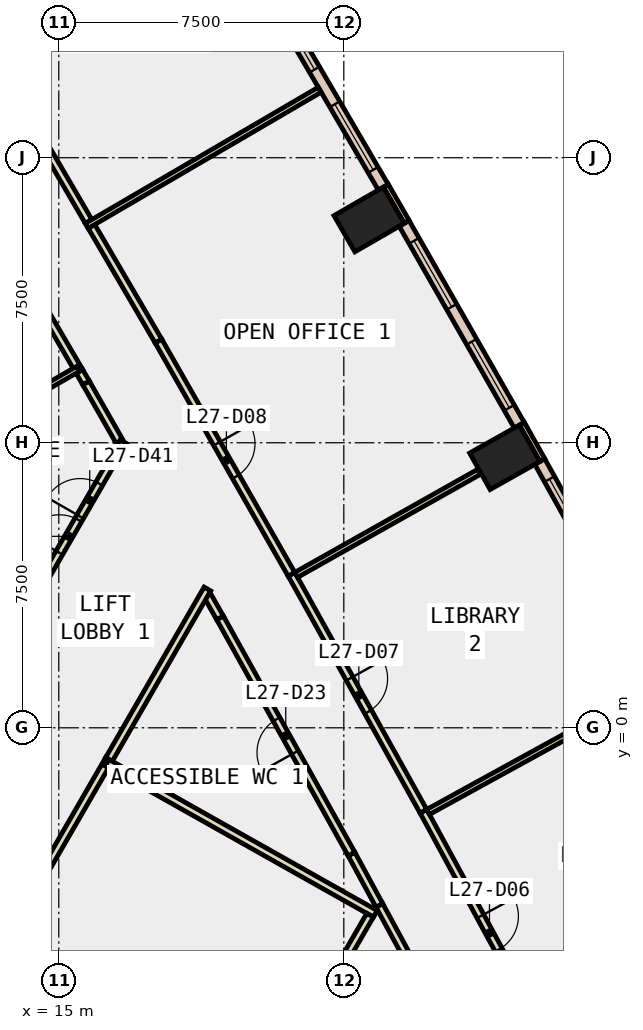
"""IFC4 building model, lengths in metres.
Left out: names, types, materials, properties, quantities, classifications, styles, units other than length and angle.
Written with IfcOpenShell. Run it as: python <this file> out.ifc"""

import sys

from ifc_helpers import new_model, si_unit, direction, frame, frame_2d, origin, origin_2d, place, context, subcontext, project, spatial, rectangle, extrude, element, fill, save


model = new_model("IFC4")
c1 = context("Model", 3, precision=1e-05, world=origin(), true_north=direction((0.0, 1.0)))
c2 = subcontext(c1, "Body", "Model", "MODEL_VIEW")
j1 = project(units=[si_unit("LENGTHUNIT", "METRE"), si_unit("PLANEANGLEUNIT", "RADIAN")], contexts=[c1])
p1 = place(None, origin())
s1 = spatial("IfcSite", under=j1, at=p1, CompositionType="ELEMENT")
p2 = place(p1, origin())
s2 = spatial("IfcBuilding", under=s1, at=p2, CompositionType="ELEMENT")
p3 = place(p2, frame((0.0, 0.0, 124.4)))
s3 = spatial("IfcBuildingStorey", under=s2, at=p3, CompositionType="ELEMENT", Elevation=124.4)
for number, where, z_axis, x_axis in (
    (1, (26.735, 7.117, -0.4), (0.0, 0.0, 1.0), (-0.49, 0.872, 0.0)),
    (2, (23.166, 13.375, -0.4), (0.0, 0.0, 1.0), (-0.5, 0.866, 0.0)),
):
    element("IfcColumn", number, at=place(p3, frame(where, z_axis=z_axis, x_axis=x_axis)), inside=s3, PredefinedType="COLUMN", context=c2, shape_type="SweptSolid", body=[
        extrude(rectangle(XDim=1.1, YDim=1.5, at=origin_2d()), origin(), (0.0, 0.0, 1.0), 4.2),
    ])
p4 = place(p3, frame((9.31, -5.375, -0.4), z_axis=(0.0, 0.0, 1.0), x_axis=(0.866017533419, -0.500013631625, 0.0)))
e3 = element("IfcWall", 3, at=p4, inside=s3, PredefinedType="SHEAR", context=c2, shape_type="SweptSolid", body=[
    extrude(rectangle(XDim=9.0, YDim=0.8, at=frame_2d((4.5, 0.0))), origin(), (0.0, 0.0, 1.0), 4.2),
])
p5 = place(p3, frame((27.724, 7.042, 0.0), z_axis=(0.0, 0.0, 1.0), x_axis=(-0.490008344094, 0.871717742574, 0.0)))
e4 = element("IfcWall", 4, at=p5, inside=s3, PredefinedType="STANDARD", context=c2, shape_type="SweptSolid", body=[
    extrude(rectangle(XDim=1.1, YDim=0.15, at=frame_2d((0.55, 0.0))), origin(), (0.0, 0.0, 1.0), 3.8),
])
p6 = place(p3, frame((24.155, 13.311, 0.0), z_axis=(0.0, 0.0, 1.0), x_axis=(-0.499933745558, 0.866063652425, 0.0)))
e5 = element("IfcWall", 5, at=p6, inside=s3, PredefinedType="STANDARD", context=c2, shape_type="SweptSolid", body=[
    extrude(rectangle(XDim=1.1, YDim=0.15, at=frame_2d((0.55, 0.0))), origin(), (0.0, 0.0, 1.0), 3.8),
])
p7 = place(p3, frame((30.629, 1.662, 0.0), z_axis=(0.0, 0.0, 1.0), x_axis=(-0.486229342917, 0.873831234327, 0.0)))
e6 = element("IfcWall", 6, at=p7, inside=s3, PredefinedType="STANDARD", context=c2, shape_type="SweptSolid", body=[
    extrude(rectangle(XDim=6.114, YDim=0.3, at=frame_2d((3.057, 0.0))), origin(), (0.0, 0.0, 1.0), 3.8),
])
p8 = place(p7, frame((0.529, 0.0, 0.9)))
e7 = element("IfcOpeningElement", 7, at=p8, cuts=e6, PredefinedType="OPENING", context=c2, shape_type="SweptSolid", body=[
    extrude(rectangle(XDim=2.0, YDim=2.6, at=frame_2d((1.0, 1.3))), frame((0.0, 0.16, 0.0), z_axis=(0.0, -1.0, 0.0), x_axis=(1.0, 0.0, 0.0)), (0.0, 0.0, 1.0), 0.32),
])
p9 = place(p7, frame((3.586, 0.0, 0.9)))
e8 = element("IfcOpeningElement", 8, at=p9, cuts=e6, PredefinedType="OPENING", context=c2, shape_type="SweptSolid", body=[
    extrude(rectangle(XDim=2.0, YDim=2.6, at=frame_2d((1.0, 1.3))), frame((0.0, 0.16, 0.0), z_axis=(0.0, -1.0, 0.0), x_axis=(1.0, 0.0, 0.0)), (0.0, 0.0, 1.0), 0.32),
])
p10 = place(p3, frame((27.117, 7.961, 0.0), z_axis=(0.0, 0.0, 1.0), x_axis=(-0.495472401298, 0.868623681206, 0.0)))
e9 = element("IfcWall", 9, at=p10, inside=s3, PredefinedType="STANDARD", context=c2, shape_type="SweptSolid", body=[
    extrude(rectangle(XDim=6.115, YDim=0.3, at=frame_2d((3.058, 0.0))), origin(), (0.0, 0.0, 1.0), 3.8),
])
p11 = place(p10, frame((0.529, 0.0, 0.9)))
e10 = element("IfcOpeningElement", 10, at=p11, cuts=e9, PredefinedType="OPENING", context=c2, shape_type="SweptSolid", body=[
    extrude(rectangle(XDim=2.0, YDim=2.6, at=frame_2d((1.0, 1.3))), frame((0.0, 0.16, 0.0), z_axis=(0.0, -1.0, 0.0), x_axis=(1.0, 0.0, 0.0)), (0.0, 0.0, 1.0), 0.32),
])
p12 = place(p10, frame((3.587, 0.0, 0.9)))
e11 = element("IfcOpeningElement", 11, at=p12, cuts=e9, PredefinedType="OPENING", context=c2, shape_type="SweptSolid", body=[
    extrude(rectangle(XDim=2.0, YDim=2.6, at=frame_2d((1.0, 1.3))), frame((0.0, 0.16, 0.0), z_axis=(0.0, -1.0, 0.0), x_axis=(1.0, 0.0, 0.0)), (0.0, 0.0, 1.0), 0.32),
])
p13 = place(p3, frame((23.538, 14.224, 0.0), z_axis=(0.0, 0.0, 1.0), x_axis=(-0.504441987427, 0.863445586775, 0.0)))
e12 = element("IfcWall", 12, at=p13, inside=s3, PredefinedType="STANDARD", context=c2, shape_type="SweptSolid", body=[
    extrude(rectangle(XDim=6.114, YDim=0.3, at=frame_2d((3.057, 0.0))), origin(), (0.0, 0.0, 1.0), 3.8),
])
p14 = place(p13, frame((0.528, 0.0, 0.9)))
e13 = element("IfcOpeningElement", 13, at=p14, cuts=e12, PredefinedType="OPENING", context=c2, shape_type="SweptSolid", body=[
    extrude(rectangle(XDim=2.0, YDim=2.6, at=frame_2d((1.0, 1.3))), frame((0.0, 0.16, 0.0), z_axis=(0.0, -1.0, 0.0), x_axis=(1.0, 0.0, 0.0)), (0.0, 0.0, 1.0), 0.32),
])
p15 = place(p13, frame((3.585, 0.0, 0.9)))
e14 = element("IfcOpeningElement", 14, at=p15, cuts=e12, PredefinedType="OPENING", context=c2, shape_type="SweptSolid", body=[
    extrude(rectangle(XDim=2.0, YDim=2.6, at=frame_2d((1.0, 1.3))), frame((0.0, 0.16, 0.0), z_axis=(0.0, -1.0, 0.0), x_axis=(1.0, 0.0, 0.0)), (0.0, 0.0, 1.0), 0.32),
])
p16 = place(p3, frame((16.601, 7.526, 0.0), z_axis=(0.0, 0.0, 1.0), x_axis=(-0.495652400286, 0.868520983103, 0.0)))
e15 = element("IfcWall", 15, at=p16, inside=s3, PredefinedType="PARTITIONING", context=c2, shape_type="SweptSolid", body=[
    extrude(rectangle(XDim=1.784, YDim=0.2, at=frame_2d((0.892, 0.0))), origin(), (0.0, 0.0, 1.0), 3.8),
])
p17 = place(p3, frame((15.717, 9.075, 0.0), z_axis=(0.0, 0.0, 1.0), x_axis=(-0.50235401398, 0.864662040706, 0.0)))
e16 = element("IfcWall", 16, at=p17, inside=s3, PredefinedType="PARTITIONING", context=c2, shape_type="SweptSolid", body=[
    extrude(rectangle(XDim=0.35, YDim=0.2, at=frame_2d((0.175, 0.0))), origin(), (0.0, 0.0, 1.0), 3.8),
])
p18 = place(p3, frame((15.541, 9.378, 0.0), z_axis=(0.0, 0.0, 1.0), x_axis=(-0.504428354193, 0.863453551435, 0.0)))
e17 = element("IfcWall", 17, at=p18, inside=s3, PredefinedType="PARTITIONING", context=c2, shape_type="SweptSolid", body=[
    extrude(rectangle(XDim=5.365, YDim=0.2, at=frame_2d((2.682, 0.0))), origin(), (0.0, 0.0, 1.0), 3.8),
])
p19 = place(p18, frame((2.182, 0.0, 0.0)))
e18 = element("IfcOpeningElement", 18, at=p19, cuts=e17, PredefinedType="OPENING", context=c2, shape_type="SweptSolid", body=[
    extrude(rectangle(XDim=1.0, YDim=2.1, at=frame_2d((0.5, 1.05))), frame((0.0, 0.11, 0.0), z_axis=(0.0, -1.0, 0.0), x_axis=(1.0, 0.0, 0.0)), (0.0, 0.0, 1.0), 0.22),
])
p20 = place(p3, frame((23.437, -4.676, 0.0), z_axis=(0.0, 0.0, 1.0), x_axis=(-0.47686467088, 0.878976726465, 0.0)))
e19 = element("IfcWall", 19, at=p20, inside=s3, PredefinedType="PARTITIONING", context=c2, shape_type="SweptSolid", body=[
    extrude(rectangle(XDim=1.542, YDim=0.2, at=frame_2d((0.771, 0.0))), origin(), (0.0, 0.0, 1.0), 3.8),
])
p21 = place(p3, frame((22.702, -3.321, 0.0), z_axis=(0.0, 0.0, 1.0), x_axis=(-0.486304341235, 0.873789498504, 0.0)))
e20 = element("IfcWall", 20, at=p21, inside=s3, PredefinedType="PARTITIONING", context=c2, shape_type="SweptSolid", body=[
    extrude(rectangle(XDim=7.113, YDim=0.2, at=frame_2d((3.556, 0.0))), origin(), (0.0, 0.0, 1.0), 3.8),
])
p22 = place(p21, frame((3.057, 0.0, 0.0)))
e21 = element("IfcOpeningElement", 21, at=p22, cuts=e20, PredefinedType="OPENING", context=c2, shape_type="SweptSolid", body=[
    extrude(rectangle(XDim=1.0, YDim=2.1, at=frame_2d((0.5, 1.05))), frame((0.0, 0.11, 0.0), z_axis=(0.0, -1.0, 0.0), x_axis=(1.0, 0.0, 0.0)), (0.0, 0.0, 1.0), 0.22),
])
p23 = place(p3, frame((19.243, 2.894, 0.0), z_axis=(0.0, 0.0, 1.0), x_axis=(-0.494108984218, 0.869399972231, 0.0)))
e22 = element("IfcWall", 22, at=p23, inside=s3, PredefinedType="PARTITIONING", context=c2, shape_type="SweptSolid", body=[
    extrude(rectangle(XDim=0.674, YDim=0.2, at=frame_2d((0.337, 0.0))), origin(), (0.0, 0.0, 1.0), 3.8),
])
p24 = place(p3, frame((26.095, -9.574, 0.0), z_axis=(0.0, 0.0, 1.0), x_axis=(-0.476963271937, 0.878923226012, 0.0)))
e23 = element("IfcWall", 23, at=p24, inside=s3, PredefinedType="PARTITIONING", context=c2, shape_type="SweptSolid", body=[
    extrude(rectangle(XDim=5.573, YDim=0.2, at=frame_2d((2.786, 0.0))), origin(), (0.0, 0.0, 1.0), 3.8),
])
p25 = place(p24, frame((2.386, 0.0, 0.0)))
e24 = element("IfcOpeningElement", 24, at=p25, cuts=e23, PredefinedType="OPENING", context=c2, shape_type="SweptSolid", body=[
    extrude(rectangle(XDim=1.0, YDim=2.1, at=frame_2d((0.5, 1.05))), frame((0.0, 0.11, 0.0), z_axis=(0.0, -1.0, 0.0), x_axis=(1.0, 0.0, 0.0)), (0.0, 0.0, 1.0), 0.22),
])
p26 = place(p3, frame((24.595, -2.196, 0.0), z_axis=(0.0, 0.0, 1.0), x_axis=(0.47695522124, -0.878927594818, 0.0)))
e25 = element("IfcWall", 25, at=p26, inside=s3, PredefinedType="PARTITIONING", context=c2, shape_type="SweptSolid", body=[
    extrude(rectangle(XDim=7.137, YDim=0.2, at=frame_2d((3.568, 0.0))), origin(), (0.0, 0.0, 1.0), 3.8),
])
p27 = place(p26, frame((3.144, 0.0, 0.0)))
e26 = element("IfcOpeningElement", 26, at=p27, cuts=e25, PredefinedType="OPENING", context=c2, shape_type="SweptSolid", body=[
    extrude(rectangle(XDim=1.0, YDim=2.1, at=frame_2d((0.5, 1.05))), frame((0.0, 0.11, 0.0), z_axis=(0.0, -1.0, 0.0), x_axis=(1.0, 0.0, 0.0)), (0.0, 0.0, 1.0), 0.22),
])
p28 = place(p3, frame((21.124, 4.04, 0.0), z_axis=(0.0, 0.0, 1.0), x_axis=(0.486229558972, -0.873831114107, 0.0)))
e27 = element("IfcWall", 27, at=p28, inside=s3, PredefinedType="PARTITIONING", context=c2, shape_type="SweptSolid", body=[
    extrude(rectangle(XDim=7.136, YDim=0.2, at=frame_2d((3.568, 0.0))), origin(), (0.0, 0.0, 1.0), 3.8),
])
p29 = place(p28, frame((3.143, 0.0, 0.0)))
e28 = element("IfcOpeningElement", 28, at=p29, cuts=e27, PredefinedType="OPENING", context=c2, shape_type="SweptSolid", body=[
    extrude(rectangle(XDim=1.0, YDim=2.1, at=frame_2d((0.5, 1.05))), frame((0.0, 0.11, 0.0), z_axis=(0.0, -1.0, 0.0), x_axis=(1.0, 0.0, 0.0)), (0.0, 0.0, 1.0), 0.22),
])
p30 = place(p3, frame((15.86, 13.193, 0.0), z_axis=(0.0, 0.0, 1.0), x_axis=(0.504383407959, -0.863479807393, 0.0)))
e29 = element("IfcWall", 29, at=p30, inside=s3, PredefinedType="PARTITIONING", context=c2, shape_type="SweptSolid", body=[
    extrude(rectangle(XDim=3.495, YDim=0.2, at=frame_2d((1.748, 0.0))), origin(), (0.0, 0.0, 1.0), 3.8),
])
p31 = place(p3, frame((17.623, 10.175, 0.0), z_axis=(0.0, 0.0, 1.0), x_axis=(0.4954688358, -0.868625714995, 0.0)))
e30 = element("IfcWall", 30, at=p31, inside=s3, PredefinedType="PARTITIONING", context=c2, shape_type="SweptSolid", body=[
    extrude(rectangle(XDim=7.064, YDim=0.2, at=frame_2d((3.532, 0.0))), origin(), (0.0, 0.0, 1.0), 3.8),
])
p32 = place(p31, frame((3.107, 0.0, 0.0)))
e31 = element("IfcOpeningElement", 31, at=p32, cuts=e30, PredefinedType="OPENING", context=c2, shape_type="SweptSolid", body=[
    extrude(rectangle(XDim=1.0, YDim=2.1, at=frame_2d((0.5, 1.05))), frame((0.0, 0.11, 0.0), z_axis=(0.0, -1.0, 0.0), x_axis=(1.0, 0.0, 0.0)), (0.0, 0.0, 1.0), 0.22),
])
p33 = place(p3, frame((14.023, 16.338, 0.0), z_axis=(0.0, 0.0, 1.0), x_axis=(0.50424043703, -0.863563304954, 0.0)))
e32 = element("IfcWall", 32, at=p33, inside=s3, PredefinedType="PARTITIONING", context=c2, shape_type="SweptSolid", body=[
    extrude(rectangle(XDim=3.492, YDim=0.2, at=frame_2d((1.746, 0.0))), origin(), (0.0, 0.0, 1.0), 3.8),
])
p34 = place(p3, frame((11.261, 6.994, 0.0), z_axis=(0.0, 0.0, 1.0), x_axis=(0.866013769041, 0.500020151426, 0.0)))
e33 = element("IfcWall", 33, at=p34, inside=s3, PredefinedType="PARTITIONING", context=c2, shape_type="SweptSolid", body=[
    extrude(rectangle(XDim=4.898, YDim=0.15, at=frame_2d((2.449, 0.0))), origin(), (0.0, 0.0, 1.0), 3.8),
])
p35 = place(p3, frame((13.827, 2.55, 0.0), z_axis=(0.0, 0.0, 1.0), x_axis=(0.500032637853, 0.866006559491, 0.0)))
e34 = element("IfcWall", 34, at=p35, inside=s3, PredefinedType="PARTITIONING", context=c2, shape_type="SweptSolid", body=[
    extrude(rectangle(XDim=5.746, YDim=0.2, at=frame_2d((2.873, 0.0))), origin(), (0.0, 0.0, 1.0), 3.8),
])
p36 = place(p35, frame((2.373, 0.0, 0.0)))
e35 = element("IfcOpeningElement", 35, at=p36, cuts=e34, PredefinedType="OPENING", context=c2, shape_type="SweptSolid", body=[
    extrude(rectangle(XDim=1.0, YDim=2.1, at=frame_2d((0.5, 1.05))), frame((0.0, 0.11, 0.0), z_axis=(0.0, -1.0, 0.0), x_axis=(1.0, 0.0, 0.0)), (0.0, 0.0, 1.0), 0.22),
])
p37 = place(p35, frame((3.473, 0.0, 0.0)))
e36 = element("IfcOpeningElement", 36, at=p37, cuts=e34, PredefinedType="OPENING", context=c2, shape_type="SweptSolid", body=[
    extrude(rectangle(XDim=1.0, YDim=2.1, at=frame_2d((0.5, 1.05))), frame((0.0, 0.11, 0.0), z_axis=(0.0, -1.0, 0.0), x_axis=(1.0, 0.0, 0.0)), (0.0, 0.0, 1.0), 0.22),
])
p38 = place(p3, frame((16.32, -0.832, 0.0), z_axis=(0.0, 0.0, 1.0), x_axis=(-0.499951642806, -0.866053321023, 0.0)))
e37 = element("IfcWall", 37, at=p38, inside=s3, PredefinedType="PARTITIONING", context=c2, shape_type="SweptSolid", body=[
    extrude(rectangle(XDim=7.039, YDim=0.2, at=frame_2d((3.52, 0.0))), origin(), (0.0, 0.0, 1.0), 3.8),
])
p39 = place(p3, frame((18.91, 3.653, 0.0), z_axis=(0.0, 0.0, 1.0), x_axis=(-0.500052967229, -0.865994820981, 0.0)))
e38 = element("IfcWall", 38, at=p39, inside=s3, PredefinedType="PARTITIONING", context=c2, shape_type="SweptSolid", body=[
    extrude(rectangle(XDim=5.179, YDim=0.2, at=frame_2d((2.59, 0.0))), origin(), (0.0, 0.0, 1.0), 3.8),
])
p40 = place(p3, frame((16.27, -0.919, 0.0), z_axis=(0.0, 0.0, 1.0), x_axis=(0.871308980511, -0.490734816863, 0.0)))
e39 = element("IfcWall", 39, at=p40, inside=s3, PredefinedType="PARTITIONING", context=c2, shape_type="SweptSolid", body=[
    extrude(rectangle(XDim=8.1, YDim=0.2, at=frame_2d((4.05, 0.0))), origin(), (0.0, 0.0, 1.0), 3.8),
])
p41 = place(p3, frame((23.191, -4.932, 0.0), z_axis=(0.0, 0.0, 1.0), x_axis=(-0.500025458316, -0.86601070492, 0.0)))
e40 = element("IfcWall", 40, at=p41, inside=s3, PredefinedType="PARTITIONING", context=c2, shape_type="SweptSolid", body=[
    extrude(rectangle(XDim=4.533, YDim=0.2, at=frame_2d((2.267, 0.0))), origin(), (0.0, 0.0, 1.0), 3.8),
])
p42 = place(p3, frame((28.123, -8.488, 0.0), z_axis=(0.0, 0.0, 1.0), x_axis=(0.881406449288, 0.472358625573, 0.0)))
e41 = element("IfcWall", 41, at=p42, inside=s3, PredefinedType="PARTITIONING", context=c2, shape_type="SweptSolid", body=[
    extrude(rectangle(XDim=5.53, YDim=0.15, at=frame_2d((2.765, 0.0))), origin(), (0.0, 0.0, 1.0), 3.8),
])
p43 = place(p3, frame((24.718, -2.214, 0.0), z_axis=(0.0, 0.0, 1.0), x_axis=(0.876382720351, 0.481615331432, 0.0)))
e42 = element("IfcWall", 42, at=p43, inside=s3, PredefinedType="PARTITIONING", context=c2, shape_type="SweptSolid", body=[
    extrude(rectangle(XDim=5.53, YDim=0.15, at=frame_2d((2.765, 0.0))), origin(), (0.0, 0.0, 1.0), 3.8),
])
p44 = place(p3, frame((21.247, 4.024, 0.0), z_axis=(0.0, 0.0, 1.0), x_axis=(0.871261721438, 0.490818716795, 0.0)))
e43 = element("IfcWall", 43, at=p44, inside=s3, PredefinedType="PARTITIONING", context=c2, shape_type="SweptSolid", body=[
    extrude(rectangle(XDim=5.53, YDim=0.15, at=frame_2d((2.765, 0.0))), origin(), (0.0, 0.0, 1.0), 3.8),
])
p45 = place(p3, frame((15.736, 13.207, 0.0), z_axis=(0.0, 0.0, 1.0), x_axis=(0.863454426155, 0.504426856892, 0.0)))
e44 = element("IfcWall", 44, at=p45, inside=s3, PredefinedType="PARTITIONING", context=c2, shape_type="SweptSolid", body=[
    extrude(rectangle(XDim=7.099, YDim=0.15, at=frame_2d((3.55, 0.0))), origin(), (0.0, 0.0, 1.0), 3.8),
])
p46 = place(p9, origin())
e45 = element("IfcWindow", 45, at=p46, inside=s3, PartitioningType="SINGLE_PANEL", PredefinedType="WINDOW", context=c2, shape_type="SweptSolid", body=[
    extrude(rectangle(XDim=2.0, YDim=2.6, at=frame_2d((1.0, 1.3))), frame((0.0, 0.03, 0.0), z_axis=(0.0, -1.0, 0.0), x_axis=(1.0, 0.0, 0.0)), (0.0, 0.0, 1.0), 0.06),
])
fill(e8, e45)
p47 = place(p11, origin())
e46 = element("IfcWindow", 46, at=p47, inside=s3, PartitioningType="SINGLE_PANEL", PredefinedType="WINDOW", context=c2, shape_type="SweptSolid", body=[
    extrude(rectangle(XDim=2.0, YDim=2.6, at=frame_2d((1.0, 1.3))), frame((0.0, 0.03, 0.0), z_axis=(0.0, -1.0, 0.0), x_axis=(1.0, 0.0, 0.0)), (0.0, 0.0, 1.0), 0.06),
])
fill(e10, e46)
p48 = place(p12, origin())
e47 = element("IfcWindow", 47, at=p48, inside=s3, PartitioningType="SINGLE_PANEL", PredefinedType="WINDOW", context=c2, shape_type="SweptSolid", body=[
    extrude(rectangle(XDim=2.0, YDim=2.6, at=frame_2d((1.0, 1.3))), frame((0.0, 0.03, 0.0), z_axis=(0.0, -1.0, 0.0), x_axis=(1.0, 0.0, 0.0)), (0.0, 0.0, 1.0), 0.06),
])
fill(e11, e47)
p49 = place(p14, origin())
e48 = element("IfcWindow", 48, at=p49, inside=s3, PartitioningType="SINGLE_PANEL", PredefinedType="WINDOW", context=c2, shape_type="SweptSolid", body=[
    extrude(rectangle(XDim=2.0, YDim=2.6, at=frame_2d((1.0, 1.3))), frame((0.0, 0.03, 0.0), z_axis=(0.0, -1.0, 0.0), x_axis=(1.0, 0.0, 0.0)), (0.0, 0.0, 1.0), 0.06),
])
fill(e13, e48)
p50 = place(p15, origin())
e49 = element("IfcWindow", 49, at=p50, inside=s3, PartitioningType="SINGLE_PANEL", PredefinedType="WINDOW", context=c2, shape_type="SweptSolid", body=[
    extrude(rectangle(XDim=2.0, YDim=2.6, at=frame_2d((1.0, 1.3))), frame((0.0, 0.03, 0.0), z_axis=(0.0, -1.0, 0.0), x_axis=(1.0, 0.0, 0.0)), (0.0, 0.0, 1.0), 0.06),
])
fill(e14, e49)
p51 = place(p27, origin())
e50 = element("IfcDoor", 50, at=p51, inside=s3, OperationType="SINGLE_SWING_LEFT", PredefinedType="DOOR", context=c2, shape_type="SweptSolid", body=[
    extrude(rectangle(XDim=1.0, YDim=2.1, at=frame_2d((0.5, 1.05))), frame((0.0, 0.025, 0.0), z_axis=(0.0, -1.0, 0.0), x_axis=(1.0, 0.0, 0.0)), (0.0, 0.0, 1.0), 0.05),
])
fill(e26, e50)
p52 = place(p29, origin())
e51 = element("IfcDoor", 51, at=p52, inside=s3, OperationType="SINGLE_SWING_RIGHT", PredefinedType="DOOR", context=c2, shape_type="SweptSolid", body=[
    extrude(rectangle(XDim=1.0, YDim=2.1, at=frame_2d((0.5, 1.05))), frame((0.0, 0.025, 0.0), z_axis=(0.0, -1.0, 0.0), x_axis=(1.0, 0.0, 0.0)), (0.0, 0.0, 1.0), 0.05),
])
fill(e28, e51)
p53 = place(p32, origin())
e52 = element("IfcDoor", 52, at=p53, inside=s3, OperationType="SINGLE_SWING_LEFT", PredefinedType="DOOR", context=c2, shape_type="SweptSolid", body=[
    extrude(rectangle(XDim=1.0, YDim=2.1, at=frame_2d((0.5, 1.05))), frame((0.0, 0.025, 0.0), z_axis=(0.0, -1.0, 0.0), x_axis=(1.0, 0.0, 0.0)), (0.0, 0.0, 1.0), 0.05),
])
fill(e31, e52)
p54 = place(p22, origin())
e53 = element("IfcDoor", 53, at=p54, inside=s3, OperationType="SINGLE_SWING_LEFT", PredefinedType="DOOR", context=c2, shape_type="SweptSolid", body=[
    extrude(rectangle(XDim=1.0, YDim=2.1, at=frame_2d((0.5, 1.05))), frame((0.0, 0.025, 0.0), z_axis=(0.0, -1.0, 0.0), x_axis=(1.0, 0.0, 0.0)), (0.0, 0.0, 1.0), 0.05),
])
fill(e21, e53)
p55 = place(p36, origin())
e54 = element("IfcDoor", 54, at=p55, inside=s3, OperationType="SINGLE_SWING_LEFT", PredefinedType="DOOR", context=c2, shape_type="SweptSolid", body=[
    extrude(rectangle(XDim=1.0, YDim=2.1, at=frame_2d((0.5, 1.05))), frame((0.0, 0.025, 0.0), z_axis=(0.0, -1.0, 0.0), x_axis=(1.0, 0.0, 0.0)), (0.0, 0.0, 1.0), 0.05),
])
fill(e35, e54)
p56 = place(p37, origin())
e55 = element("IfcDoor", 55, at=p56, inside=s3, OperationType="SINGLE_SWING_RIGHT", PredefinedType="DOOR", context=c2, shape_type="SweptSolid", body=[
    extrude(rectangle(XDim=1.0, YDim=2.1, at=frame_2d((0.5, 1.05))), frame((0.0, 0.025, 0.0), z_axis=(0.0, -1.0, 0.0), x_axis=(1.0, 0.0, 0.0)), (0.0, 0.0, 1.0), 0.05),
])
fill(e36, e55)
save(model, sys.argv[1])
